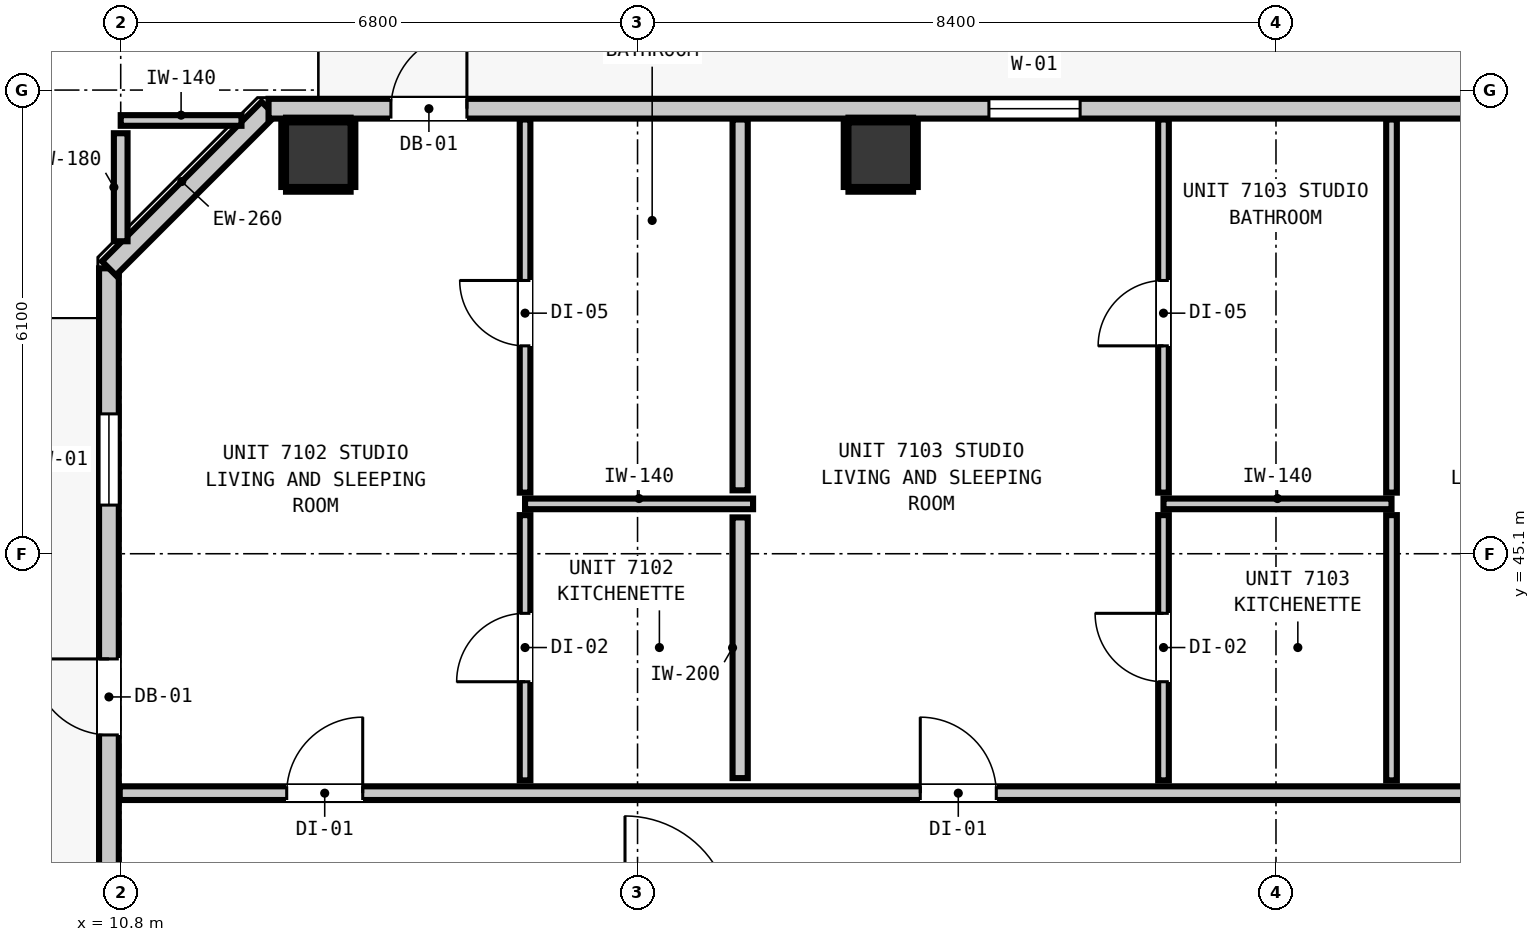
"""IFC4 building model, lengths in metres.
Left out: names, types, materials, properties, quantities, classifications, styles, units other than length and angle.
Written with IfcOpenShell. Run it as: python <this file> out.ifc"""

import sys

from ifc_helpers import new_model, si_unit, direction, frame, frame_2d, origin, origin_2d, place, context, subcontext, project, spatial, rectangle, extrude, element, fill, save


model = new_model("IFC4")
c1 = context("Model", 3, precision=1e-05, world=origin(), true_north=direction((0.0, 1.0)))
c2 = subcontext(c1, "Body", "Model", "MODEL_VIEW")
j1 = project(units=[si_unit("LENGTHUNIT", "METRE"), si_unit("PLANEANGLEUNIT", "RADIAN")], contexts=[c1])
p1 = place(None, origin())
s1 = spatial("IfcSite", under=j1, at=p1, CompositionType="ELEMENT")
p2 = place(p1, origin())
s2 = spatial("IfcBuilding", under=s1, at=p2, CompositionType="ELEMENT")
p3 = place(p2, frame((0.0, 0.0, 244.56)))
s3 = spatial("IfcBuildingStorey", under=s2, at=p3, CompositionType="ELEMENT", Elevation=244.56)
for number, where, z_axis, x_axis in (
    (1, (13.4, 50.35, 0.0), (0.0, 0.0, 1.0), (1.0, 0.0, 0.0)),
    (2, (20.8, 50.35, 0.0), (0.0, 0.0, 1.0), (1.0, 0.0, 0.0)),
):
    element("IfcColumn", number, at=place(p3, frame(where, z_axis=z_axis, x_axis=x_axis)), inside=s3, PredefinedType="COLUMN", context=c2, shape_type="SweptSolid", body=[
        extrude(rectangle(XDim=0.85, YDim=0.85, at=origin_2d()), origin(), (0.0, 0.0, 1.0), 3.32),
    ])
p4 = place(p3, frame((10.645, 18.545, 0.0), z_axis=(0.0, 0.0, 1.0), x_axis=(0.0, 1.0, 0.0)))
e3 = element("IfcWall", 3, at=p4, inside=s3, PredefinedType="STANDARD", context=c2, shape_type="SweptSolid", body=[
    extrude(rectangle(XDim=30.31, YDim=0.26, at=frame_2d((15.155, 0.0))), origin(), (0.0, 0.0, 1.0), 3.1),
])
p5 = place(p4, frame((24.171, 0.0, 0.0)))
e4 = element("IfcOpeningElement", 4, at=p5, cuts=e3, PredefinedType="OPENING", context=c2, shape_type="SweptSolid", body=[
    extrude(rectangle(XDim=1.0, YDim=2.15, at=frame_2d((0.5, 1.075))), frame((0.0, 0.14, 0.0), z_axis=(0.0, -1.0, 0.0), x_axis=(1.0, 0.0, 0.0)), (0.0, 0.0, 1.0), 0.28),
])
p6 = place(p4, frame((27.195, 0.0, 0.85)))
e5 = element("IfcOpeningElement", 5, at=p6, cuts=e3, PredefinedType="OPENING", context=c2, shape_type="SweptSolid", body=[
    extrude(rectangle(XDim=1.2, YDim=1.8, at=frame_2d((0.6, 0.9))), frame((0.0, 0.14, 0.0), z_axis=(0.0, -1.0, 0.0), x_axis=(1.0, 0.0, 0.0)), (0.0, 0.0, 1.0), 0.28),
])
p7 = place(p3, frame((10.645, 48.855, 0.0), z_axis=(0.0, 0.0, 1.0), x_axis=(0.707106781187, 0.707106781187, 0.0)))
e6 = element("IfcWall", 6, at=p7, inside=s3, PredefinedType="STANDARD", context=c2, shape_type="SweptSolid", body=[
    extrude(rectangle(XDim=2.97, YDim=0.26, at=frame_2d((1.485, 0.0))), origin(), (0.0, 0.0, 1.0), 3.1),
])
p8 = place(p3, frame((12.745, 50.955, 0.0), z_axis=(0.0, 0.0, 1.0), x_axis=(1.0, 0.0, 0.0)))
e7 = element("IfcWall", 7, at=p8, inside=s3, PredefinedType="STANDARD", context=c2, shape_type="SweptSolid", body=[
    extrude(rectangle(XDim=32.71, YDim=0.26, at=frame_2d((16.355, 0.0))), origin(), (0.0, 0.0, 1.0), 3.1),
])
p9 = place(p8, frame((1.61, 0.0, 0.0)))
e8 = element("IfcOpeningElement", 8, at=p9, cuts=e7, PredefinedType="OPENING", context=c2, shape_type="SweptSolid", body=[
    extrude(rectangle(XDim=1.0, YDim=2.15, at=frame_2d((0.5, 1.075))), frame((0.0, 0.14, 0.0), z_axis=(0.0, -1.0, 0.0), x_axis=(1.0, 0.0, 0.0)), (0.0, 0.0, 1.0), 0.28),
])
p10 = place(p8, frame((9.478, 0.0, 0.85)))
e9 = element("IfcOpeningElement", 9, at=p10, cuts=e7, PredefinedType="OPENING", context=c2, shape_type="SweptSolid", body=[
    extrude(rectangle(XDim=1.2, YDim=1.8, at=frame_2d((0.6, 0.9))), frame((0.0, 0.14, 0.0), z_axis=(0.0, -1.0, 0.0), x_axis=(1.0, 0.0, 0.0)), (0.0, 0.0, 1.0), 0.28),
])
p11 = place(p8, frame((17.44, 0.0, 0.85)))
e10 = element("IfcOpeningElement", 10, at=p11, cuts=e7, PredefinedType="OPENING", context=c2, shape_type="SweptSolid", body=[
    extrude(rectangle(XDim=1.2, YDim=1.8, at=frame_2d((0.6, 0.9))), frame((0.0, 0.14, 0.0), z_axis=(0.0, -1.0, 0.0), x_axis=(1.0, 0.0, 0.0)), (0.0, 0.0, 1.0), 0.28),
])
p12 = place(p8, frame((27.267, 0.0, 0.85)))
e11 = element("IfcOpeningElement", 11, at=p12, cuts=e7, PredefinedType="OPENING", context=c2, shape_type="SweptSolid", body=[
    extrude(rectangle(XDim=1.2, YDim=1.8, at=frame_2d((0.6, 0.9))), frame((0.0, 0.14, 0.0), z_axis=(0.0, -1.0, 0.0), x_axis=(1.0, 0.0, 0.0)), (0.0, 0.0, 1.0), 0.28),
])
p13 = place(p3, frame((10.787, 41.95, 0.0), z_axis=(0.0, 0.0, 1.0), x_axis=(1.0, 0.0, 0.0)))
e12 = element("IfcWall", 12, at=p13, inside=s3, PredefinedType="PARTITIONING", context=c2, shape_type="SweptSolid", body=[
    extrude(rectangle(XDim=36.626, YDim=0.18, at=frame_2d((18.313, 0.0))), origin(), (0.0, 0.0, 1.0), 3.1),
])
p14 = place(p13, frame((2.197, 0.0, 0.0)))
e13 = element("IfcOpeningElement", 13, at=p14, cuts=e12, PredefinedType="OPENING", context=c2, shape_type="SweptSolid", body=[
    extrude(rectangle(XDim=1.0, YDim=2.15, at=frame_2d((0.5, 1.075))), frame((0.0, 0.1, 0.0), z_axis=(0.0, -1.0, 0.0), x_axis=(1.0, 0.0, 0.0)), (0.0, 0.0, 1.0), 0.2),
])
p15 = place(p13, frame((10.533, 0.0, 0.0)))
e14 = element("IfcOpeningElement", 14, at=p15, cuts=e12, PredefinedType="OPENING", context=c2, shape_type="SweptSolid", body=[
    extrude(rectangle(XDim=1.0, YDim=2.15, at=frame_2d((0.5, 1.075))), frame((0.0, 0.1, 0.0), z_axis=(0.0, -1.0, 0.0), x_axis=(1.0, 0.0, 0.0)), (0.0, 0.0, 1.0), 0.2),
])
p16 = place(p13, frame((18.496, 0.0, 0.0)))
e15 = element("IfcOpeningElement", 15, at=p16, cuts=e12, PredefinedType="OPENING", context=c2, shape_type="SweptSolid", body=[
    extrude(rectangle(XDim=1.0, YDim=2.15, at=frame_2d((0.5, 1.075))), frame((0.0, 0.1, 0.0), z_axis=(0.0, -1.0, 0.0), x_axis=(1.0, 0.0, 0.0)), (0.0, 0.0, 1.0), 0.2),
])
p17 = place(p13, frame((28.323, 0.0, 0.0)))
e16 = element("IfcOpeningElement", 16, at=p17, cuts=e12, PredefinedType="OPENING", context=c2, shape_type="SweptSolid", body=[
    extrude(rectangle(XDim=1.0, YDim=2.15, at=frame_2d((0.5, 1.075))), frame((0.0, 0.1, 0.0), z_axis=(0.0, -1.0, 0.0), x_axis=(1.0, 0.0, 0.0)), (0.0, 0.0, 1.0), 0.2),
])
for number, where, z_axis, x_axis in (
    (17, (16.12, 45.756, 0.0), (0.0, 0.0, 1.0), (1.0, 0.0, 0.0)),
    (18, (24.52, 45.756, 0.0), (0.0, 0.0, 1.0), (1.0, 0.0, 0.0)),
):
    element("IfcWall", number, at=place(p3, frame(where, z_axis=z_axis, x_axis=x_axis)), inside=s3, PredefinedType="PARTITIONING", context=c2, shape_type="SweptSolid", body=[
        extrude(rectangle(XDim=3.0, YDim=0.14, at=frame_2d((1.5, 0.0))), origin(), (0.0, 0.0, 1.0), 3.1),
    ])
p18 = place(p3, frame((10.8, 50.8, 0.0), z_axis=(0.0, 0.0, 1.0), x_axis=(1.0, 0.0, 0.0)))
e19 = element("IfcWall", 19, at=p18, inside=s3, PredefinedType="PARTITIONING", context=c2, shape_type="SweptSolid", body=[
    extrude(rectangle(XDim=1.589, YDim=0.14, at=frame_2d((0.794, 0.0))), origin(), (0.0, 0.0, 1.0), 3.1),
])
p19 = place(p3, frame((18.95, 42.148, 0.0), z_axis=(0.0, 0.0, 1.0), x_axis=(0.0, 1.0, 0.0)))
e20 = element("IfcWall", 20, at=p19, inside=s3, PredefinedType="PARTITIONING", context=c2, shape_type="SweptSolid", body=[
    extrude(rectangle(XDim=3.43, YDim=0.2, at=frame_2d((1.715, 0.0))), origin(), (0.0, 0.0, 1.0), 3.1),
])
p20 = place(p3, frame((18.95, 45.934, 0.0), z_axis=(0.0, 0.0, 1.0), x_axis=(0.0, 1.0, 0.0)))
e21 = element("IfcWall", 21, at=p20, inside=s3, PredefinedType="PARTITIONING", context=c2, shape_type="SweptSolid", body=[
    extrude(rectangle(XDim=4.879, YDim=0.2, at=frame_2d((2.439, 0.0))), origin(), (0.0, 0.0, 1.0), 3.1),
])
p21 = place(p3, frame((10.8, 49.211, 0.0), z_axis=(0.0, 0.0, 1.0), x_axis=(0.0, 1.0, 0.0)))
e22 = element("IfcWall", 22, at=p21, inside=s3, PredefinedType="PARTITIONING", context=c2, shape_type="SweptSolid", body=[
    extrude(rectangle(XDim=1.421, YDim=0.18, at=frame_2d((0.71, 0.0))), origin(), (0.0, 0.0, 1.0), 3.1),
])
p22 = place(p3, frame((16.12, 42.118, 0.0), z_axis=(0.0, 0.0, 1.0), x_axis=(0.0, 1.0, 0.0)))
e23 = element("IfcWall", 23, at=p22, inside=s3, PredefinedType="PARTITIONING", context=c2, shape_type="SweptSolid", body=[
    extrude(rectangle(XDim=3.49, YDim=0.14, at=frame_2d((1.745, 0.0))), origin(), (0.0, 0.0, 1.0), 3.1),
])
p23 = place(p22, frame((1.298, 0.0, 0.0)))
e24 = element("IfcOpeningElement", 24, at=p23, cuts=e23, PredefinedType="OPENING", context=c2, shape_type="SweptSolid", body=[
    extrude(rectangle(XDim=0.9, YDim=2.1, at=frame_2d((0.45, 1.05))), frame((0.0, 0.08, 0.0), z_axis=(0.0, -1.0, 0.0), x_axis=(1.0, 0.0, 0.0)), (0.0, 0.0, 1.0), 0.16),
])
p24 = place(p3, frame((16.12, 45.904, 0.0), z_axis=(0.0, 0.0, 1.0), x_axis=(0.0, 1.0, 0.0)))
e25 = element("IfcWall", 25, at=p24, inside=s3, PredefinedType="PARTITIONING", context=c2, shape_type="SweptSolid", body=[
    extrude(rectangle(XDim=4.909, YDim=0.14, at=frame_2d((2.455, 0.0))), origin(), (0.0, 0.0, 1.0), 3.1),
])
p25 = place(p24, frame((1.931, 0.0, 0.0)))
e26 = element("IfcOpeningElement", 26, at=p25, cuts=e25, PredefinedType="OPENING", context=c2, shape_type="SweptSolid", body=[
    extrude(rectangle(XDim=0.86, YDim=2.02, at=frame_2d((0.43, 1.01))), frame((0.0, 0.08, 0.0), z_axis=(0.0, -1.0, 0.0), x_axis=(1.0, 0.0, 0.0)), (0.0, 0.0, 1.0), 0.16),
])
p26 = place(p3, frame((24.52, 42.118, 0.0), z_axis=(0.0, 0.0, 1.0), x_axis=(0.0, 1.0, 0.0)))
e27 = element("IfcWall", 27, at=p26, inside=s3, PredefinedType="PARTITIONING", context=c2, shape_type="SweptSolid", body=[
    extrude(rectangle(XDim=3.49, YDim=0.14, at=frame_2d((1.745, 0.0))), origin(), (0.0, 0.0, 1.0), 3.1),
])
p27 = place(p26, frame((1.298, 0.0, 0.0)))
e28 = element("IfcOpeningElement", 28, at=p27, cuts=e27, PredefinedType="OPENING", context=c2, shape_type="SweptSolid", body=[
    extrude(rectangle(XDim=0.9, YDim=2.1, at=frame_2d((0.45, 1.05))), frame((0.0, 0.08, 0.0), z_axis=(0.0, -1.0, 0.0), x_axis=(1.0, 0.0, 0.0)), (0.0, 0.0, 1.0), 0.16),
])
p28 = place(p3, frame((24.52, 45.904, 0.0), z_axis=(0.0, 0.0, 1.0), x_axis=(0.0, 1.0, 0.0)))
e29 = element("IfcWall", 29, at=p28, inside=s3, PredefinedType="PARTITIONING", context=c2, shape_type="SweptSolid", body=[
    extrude(rectangle(XDim=4.909, YDim=0.14, at=frame_2d((2.455, 0.0))), origin(), (0.0, 0.0, 1.0), 3.1),
])
p29 = place(p28, frame((1.931, 0.0, 0.0)))
e30 = element("IfcOpeningElement", 30, at=p29, cuts=e29, PredefinedType="OPENING", context=c2, shape_type="SweptSolid", body=[
    extrude(rectangle(XDim=0.86, YDim=2.02, at=frame_2d((0.43, 1.01))), frame((0.0, 0.08, 0.0), z_axis=(0.0, -1.0, 0.0), x_axis=(1.0, 0.0, 0.0)), (0.0, 0.0, 1.0), 0.16),
])
p30 = place(p3, frame((27.52, 42.118, 0.0), z_axis=(0.0, 0.0, 1.0), x_axis=(0.0, 1.0, 0.0)))
e31 = element("IfcWall", 31, at=p30, inside=s3, PredefinedType="PARTITIONING", context=c2, shape_type="SweptSolid", body=[
    extrude(rectangle(XDim=3.49, YDim=0.14, at=frame_2d((1.745, 0.0))), origin(), (0.0, 0.0, 1.0), 3.1),
])
p31 = place(p3, frame((27.52, 45.904, 0.0), z_axis=(0.0, 0.0, 1.0), x_axis=(0.0, 1.0, 0.0)))
e32 = element("IfcWall", 32, at=p31, inside=s3, PredefinedType="PARTITIONING", context=c2, shape_type="SweptSolid", body=[
    extrude(rectangle(XDim=4.909, YDim=0.14, at=frame_2d((2.455, 0.0))), origin(), (0.0, 0.0, 1.0), 3.1),
])
for number, where, z_axis, x_axis in (
    (33, (12.975, 49.893, 0.0), (0.0, 0.0, 1.0), (1.0, 0.0, 0.0)),
    (34, (12.975, 50.807, 0.0), (0.0, 0.0, 1.0), (1.0, 0.0, 0.0)),
    (35, (12.943, 49.925, 0.0), (0.0, 0.0, 1.0), (0.0, 1.0, 0.0)),
    (36, (13.857, 49.925, 0.0), (0.0, 0.0, 1.0), (0.0, 1.0, 0.0)),
):
    element("IfcWall", number, at=place(p3, frame(where, z_axis=z_axis, x_axis=x_axis)), inside=s3, PredefinedType="PARTITIONING", context=c2, shape_type="SweptSolid", body=[
        extrude(rectangle(XDim=0.85, YDim=0.06, at=frame_2d((0.425, 0.0))), origin(), (0.0, 0.0, 1.0), 1.45),
    ])
for number, where, z_axis, x_axis in (
    (37, (20.375, 49.893, 0.0), (0.0, 0.0, 1.0), (1.0, 0.0, 0.0)),
    (38, (20.375, 50.807, 0.0), (0.0, 0.0, 1.0), (1.0, 0.0, 0.0)),
):
    element("IfcWall", number, at=place(p3, frame(where, z_axis=z_axis, x_axis=x_axis)), inside=s3, PredefinedType="PARTITIONING", context=c2, shape_type="SweptSolid", body=[
        extrude(rectangle(XDim=0.85, YDim=0.06, at=frame_2d((0.425, 0.0))), origin(), (0.0, 0.0, 1.0), 1.45),
    ])
for number, where, z_axis, x_axis in (
    (39, (20.343, 49.925, 0.0), (0.0, 0.0, 1.0), (0.0, 1.0, 0.0)),
    (40, (21.257, 49.925, 0.0), (0.0, 0.0, 1.0), (0.0, 1.0, 0.0)),
):
    element("IfcWall", number, at=place(p3, frame(where, z_axis=z_axis, x_axis=x_axis)), inside=s3, PredefinedType="PARTITIONING", context=c2, shape_type="SweptSolid", body=[
        extrude(rectangle(XDim=0.85, YDim=0.06, at=frame_2d((0.425, 0.0))), origin(), (0.0, 0.0, 1.0), 1.45),
    ])
p32 = place(p9, origin())
e41 = element("IfcDoor", 41, at=p32, inside=s3, OperationType="SINGLE_SWING_RIGHT", PredefinedType="DOOR", context=c2, shape_type="SweptSolid", body=[
    extrude(rectangle(XDim=1.0, YDim=2.15, at=frame_2d((0.5, 1.075))), frame((0.0, 0.025, 0.0), z_axis=(0.0, -1.0, 0.0), x_axis=(1.0, 0.0, 0.0)), (0.0, 0.0, 1.0), 0.05),
])
fill(e8, e41)
p33 = place(p5, origin())
e42 = element("IfcDoor", 42, at=p33, inside=s3, OperationType="SINGLE_SWING_RIGHT", PredefinedType="DOOR", context=c2, shape_type="SweptSolid", body=[
    extrude(rectangle(XDim=1.0, YDim=2.15, at=frame_2d((0.5, 1.075))), frame((0.0, 0.025, 0.0), z_axis=(0.0, -1.0, 0.0), x_axis=(1.0, 0.0, 0.0)), (0.0, 0.0, 1.0), 0.05),
])
fill(e4, e42)
p34 = place(p6, origin())
e43 = element("IfcWindow", 43, at=p34, inside=s3, PartitioningType="SINGLE_PANEL", PredefinedType="WINDOW", context=c2, shape_type="SweptSolid", body=[
    extrude(rectangle(XDim=1.2, YDim=1.8, at=frame_2d((0.6, 0.9))), frame((0.0, 0.03, 0.0), z_axis=(0.0, -1.0, 0.0), x_axis=(1.0, 0.0, 0.0)), (0.0, 0.0, 1.0), 0.06),
])
fill(e5, e43)
p35 = place(p10, origin())
e44 = element("IfcWindow", 44, at=p35, inside=s3, PartitioningType="SINGLE_PANEL", PredefinedType="WINDOW", context=c2, shape_type="SweptSolid", body=[
    extrude(rectangle(XDim=1.2, YDim=1.8, at=frame_2d((0.6, 0.9))), frame((0.0, 0.03, 0.0), z_axis=(0.0, -1.0, 0.0), x_axis=(1.0, 0.0, 0.0)), (0.0, 0.0, 1.0), 0.06),
])
fill(e9, e44)
p36 = place(p14, origin())
e45 = element("IfcDoor", 45, at=p36, inside=s3, OperationType="SINGLE_SWING_RIGHT", PredefinedType="DOOR", context=c2, shape_type="SweptSolid", body=[
    extrude(rectangle(XDim=1.0, YDim=2.15, at=frame_2d((0.5, 1.075))), frame((0.0, 0.025, 0.0), z_axis=(0.0, -1.0, 0.0), x_axis=(1.0, 0.0, 0.0)), (0.0, 0.0, 1.0), 0.05),
])
fill(e13, e45)
p37 = place(p23, origin())
e46 = element("IfcDoor", 46, at=p37, inside=s3, OperationType="SINGLE_SWING_LEFT", PredefinedType="DOOR", context=c2, shape_type="SweptSolid", body=[
    extrude(rectangle(XDim=0.9, YDim=2.1, at=frame_2d((0.45, 1.05))), frame((0.0, 0.025, 0.0), z_axis=(0.0, -1.0, 0.0), x_axis=(1.0, 0.0, 0.0)), (0.0, 0.0, 1.0), 0.05),
])
fill(e24, e46)
p38 = place(p25, origin())
e47 = element("IfcDoor", 47, at=p38, inside=s3, OperationType="SINGLE_SWING_RIGHT", PredefinedType="DOOR", context=c2, shape_type="SweptSolid", body=[
    extrude(rectangle(XDim=0.86, YDim=2.02, at=frame_2d((0.43, 1.01))), frame((0.0, 0.025, 0.0), z_axis=(0.0, -1.0, 0.0), x_axis=(1.0, 0.0, 0.0)), (0.0, 0.0, 1.0), 0.05),
])
fill(e26, e47)
p39 = place(p15, origin())
e48 = element("IfcDoor", 48, at=p39, inside=s3, OperationType="SINGLE_SWING_LEFT", PredefinedType="DOOR", context=c2, shape_type="SweptSolid", body=[
    extrude(rectangle(XDim=1.0, YDim=2.15, at=frame_2d((0.5, 1.075))), frame((0.0, 0.025, 0.0), z_axis=(0.0, -1.0, 0.0), x_axis=(1.0, 0.0, 0.0)), (0.0, 0.0, 1.0), 0.05),
])
fill(e14, e48)
p40 = place(p27, origin())
e49 = element("IfcDoor", 49, at=p40, inside=s3, OperationType="SINGLE_SWING_RIGHT", PredefinedType="DOOR", context=c2, shape_type="SweptSolid", body=[
    extrude(rectangle(XDim=0.9, YDim=2.1, at=frame_2d((0.45, 1.05))), frame((0.0, 0.025, 0.0), z_axis=(0.0, -1.0, 0.0), x_axis=(1.0, 0.0, 0.0)), (0.0, 0.0, 1.0), 0.05),
])
fill(e28, e49)
p41 = place(p29, origin())
e50 = element("IfcDoor", 50, at=p41, inside=s3, OperationType="SINGLE_SWING_LEFT", PredefinedType="DOOR", context=c2, shape_type="SweptSolid", body=[
    extrude(rectangle(XDim=0.86, YDim=2.02, at=frame_2d((0.43, 1.01))), frame((0.0, 0.025, 0.0), z_axis=(0.0, -1.0, 0.0), x_axis=(1.0, 0.0, 0.0)), (0.0, 0.0, 1.0), 0.05),
])
fill(e30, e50)
save(model, sys.argv[1])
